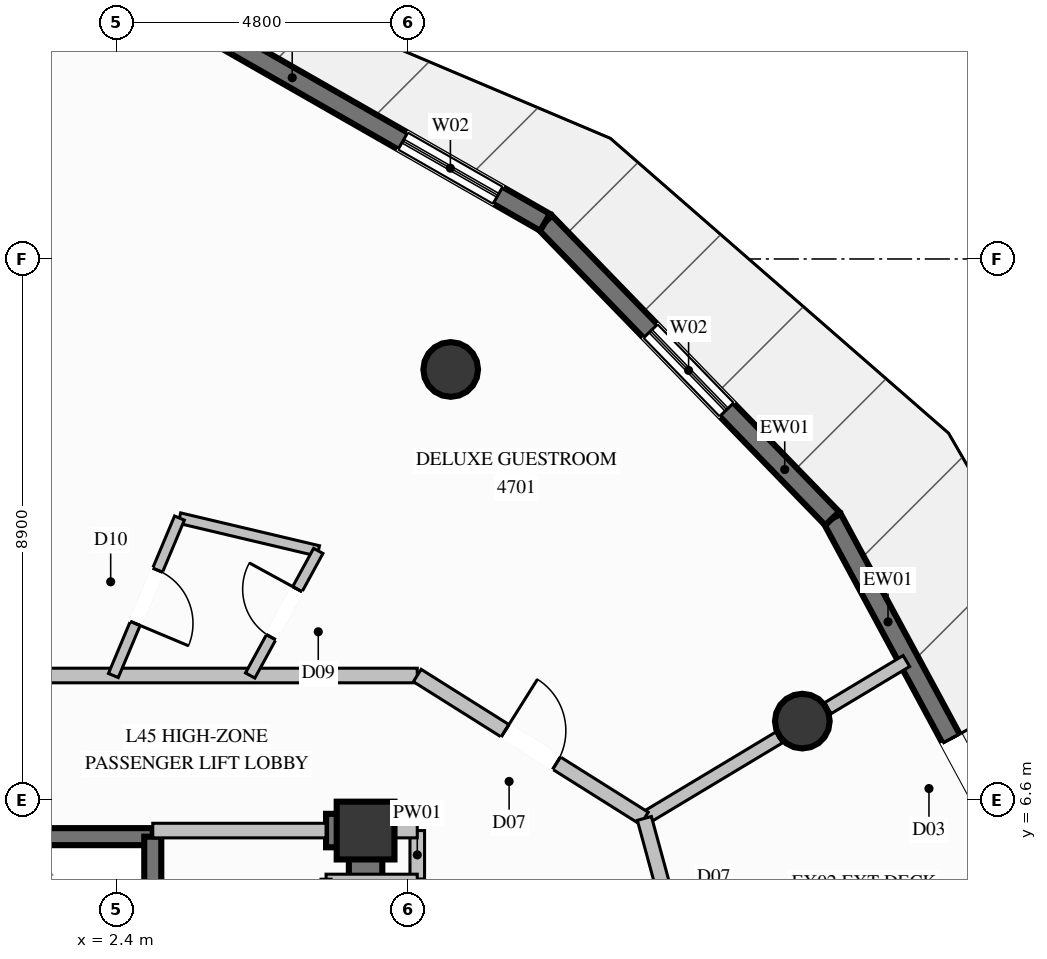
"""IFC4 building model, lengths in metres.
Left out: names, types, materials, properties, quantities, classifications, styles, units other than length and angle.
Written with IfcOpenShell. Run it as: python <this file> out.ifc"""

import sys

from ifc_helpers import new_model, si_unit, direction, frame, frame_2d, origin, origin_2d, place, context, subcontext, project, spatial, rectangle, circle, extrude, element, fill, save


model = new_model("IFC4")
c1 = context("Model", 3, precision=1e-05, world=origin(), true_north=direction((0.0, 1.0)))
c2 = subcontext(c1, "Body", "Model", "MODEL_VIEW")
j1 = project(units=[si_unit("LENGTHUNIT", "METRE"), si_unit("PLANEANGLEUNIT", "RADIAN")], contexts=[c1])
p1 = place(None, origin())
s1 = spatial("IfcSite", under=j1, at=p1, CompositionType="ELEMENT")
p2 = place(p1, origin())
s2 = spatial("IfcBuilding", under=s1, at=p2, CompositionType="ELEMENT")
p3 = place(p2, frame((0.0, 0.0, 176.8)))
s3 = spatial("IfcBuildingStorey", under=s2, at=p3, CompositionType="ELEMENT", Elevation=176.8)
p4 = place(p3, frame((6.5, 6.1, 0.0), z_axis=(0.0, 0.0, 1.0), x_axis=(1.0, 0.0, 0.0)))
e1 = element("IfcColumn", 1, at=p4, inside=s3, PredefinedType="COLUMN", context=c2, shape_type="SweptSolid", body=[
    extrude(rectangle(XDim=0.95, YDim=0.95, at=origin_2d()), origin(), (0.0, 0.0, 1.0), 3.6),
])
p5 = place(p3, frame((5.85, 6.1, 0.0), z_axis=(0.0, 0.0, 1.0), x_axis=(1.0, 0.0, 0.0)))
e2 = element("IfcWall", 2, at=p5, inside=s3, PredefinedType="SHEAR", context=c2, shape_type="SweptSolid", body=[
    extrude(rectangle(XDim=0.375, YDim=0.55, at=frame_2d((0.188, 0.0))), origin(), (0.0, 0.0, 1.0), 3.6),
])
p6 = place(p3, frame((6.5, 3.35, 0.0), z_axis=(0.0, 0.0, 1.0), x_axis=(0.0, 1.0, 0.0)))
e3 = element("IfcWall", 3, at=p6, inside=s3, PredefinedType="SHEAR", context=c2, shape_type="SweptSolid", body=[
    extrude(rectangle(XDim=3.025, YDim=0.55, at=frame_2d((1.512, 0.0))), origin(), (0.0, 0.0, 1.0), 3.6),
])
for number, where, z_axis, x_axis in (
    (4, (13.683, 7.9, 0.0), (0.0, 0.0, 1.0), (1.0, 0.0, 0.0)),
    (5, (7.9, 13.683, 0.0), (0.0, 0.0, 1.0), (1.0, 0.0, 0.0)),
):
    element("IfcColumn", number, at=place(p3, frame(where, z_axis=z_axis, x_axis=x_axis)), inside=s3, PredefinedType="COLUMN", context=c2, shape_type="SweptSolid", body=[
        extrude(circle(Radius=0.45, at=origin_2d()), origin(), (0.0, 0.0, 1.0), 3.6),
    ])
p7 = place(p3, frame((14.174, 11.232, 0.0), z_axis=(0.0, 0.0, 1.0), x_axis=(0.475159501302, -0.879899680829, 0.0)))
e6 = element("IfcWall", 6, at=p7, inside=s3, PredefinedType="SOLIDWALL", context=c2, shape_type="SweptSolid", body=[
    extrude(rectangle(XDim=6.785, YDim=0.32, at=frame_2d((3.393, 0.0))), origin(), (0.0, 0.0, 1.0), 3.36),
])
p8 = place(p7, frame((4.114, 0.0, 0.0)))
e7 = element("IfcOpeningElement", 7, at=p8, cuts=e6, PredefinedType="OPENING", context=c2, shape_type="SweptSolid", body=[
    extrude(rectangle(XDim=1.1, YDim=2.2, at=frame_2d((0.55, 1.1))), frame((0.0, 0.17, 0.0), z_axis=(0.0, -1.0, 0.0), x_axis=(1.0, 0.0, 0.0)), (0.0, 0.0, 1.0), 0.34),
])
p9 = place(p3, frame((9.451, 16.103, 0.0), z_axis=(0.0, 0.0, 1.0), x_axis=(0.696119985346, -0.71792545992, 0.0)))
e8 = element("IfcWall", 8, at=p9, inside=s3, PredefinedType="SOLIDWALL", context=c2, shape_type="SweptSolid", body=[
    extrude(rectangle(XDim=6.785, YDim=0.32, at=frame_2d((3.393, 0.0))), origin(), (0.0, 0.0, 1.0), 3.36),
])
p10 = place(p9, frame((2.492, 0.0, 0.35)))
e9 = element("IfcOpeningElement", 9, at=p10, cuts=e8, PredefinedType="OPENING", context=c2, shape_type="SweptSolid", body=[
    extrude(rectangle(XDim=1.8, YDim=2.6, at=frame_2d((0.9, 1.3))), frame((0.0, 0.17, 0.0), z_axis=(0.0, -1.0, 0.0), x_axis=(1.0, 0.0, 0.0)), (0.0, 0.0, 1.0), 0.34),
])
p11 = place(p3, frame((3.69, 19.398, 0.0), z_axis=(0.0, 0.0, 1.0), x_axis=(0.868052920032, -0.496471678974, 0.0)))
e10 = element("IfcWall", 10, at=p11, inside=s3, PredefinedType="SOLIDWALL", context=c2, shape_type="SweptSolid", body=[
    extrude(rectangle(XDim=6.637, YDim=0.32, at=frame_2d((3.318, 0.0))), origin(), (0.0, 0.0, 1.0), 3.36),
])
p12 = place(p11, frame((3.944, 0.0, 0.35)))
e11 = element("IfcOpeningElement", 11, at=p12, cuts=e10, PredefinedType="OPENING", context=c2, shape_type="SweptSolid", body=[
    extrude(rectangle(XDim=1.8, YDim=2.6, at=frame_2d((0.9, 1.3))), frame((0.0, 0.17, 0.0), z_axis=(0.0, -1.0, 0.0), x_axis=(1.0, 0.0, 0.0)), (0.0, 0.0, 1.0), 0.34),
])
p13 = place(p3, frame((3.0, 6.0, 0.0), z_axis=(0.0, 0.0, 1.0), x_axis=(-1.0, 0.0, 0.0)))
e12 = element("IfcWall", 12, at=p13, inside=s3, PredefinedType="SOLIDWALL", context=c2, shape_type="SweptSolid", body=[
    extrude(rectangle(XDim=2.2, YDim=0.28, at=frame_2d((1.1, 0.0))), origin(), (0.0, 0.0, 1.0), 3.36),
])
p14 = place(p3, frame((3.0, 3.5, 0.0), z_axis=(0.0, 0.0, 1.0), x_axis=(0.0, 1.0, 0.0)))
e13 = element("IfcWall", 13, at=p14, inside=s3, PredefinedType="SOLIDWALL", context=c2, shape_type="SweptSolid", body=[
    extrude(rectangle(XDim=2.5, YDim=0.28, at=frame_2d((1.25, 0.0))), origin(), (0.0, 0.0, 1.0), 3.36),
])
p15 = place(p3, frame((-7.35, 8.65, 0.0), z_axis=(0.0, 0.0, 1.0), x_axis=(1.0, 0.0, 0.0)))
e14 = element("IfcWall", 14, at=p15, inside=s3, PredefinedType="PARTITIONING", context=c2, shape_type="SweptSolid", body=[
    extrude(rectangle(XDim=14.7, YDim=0.24, at=frame_2d((7.35, 0.0))), origin(), (0.0, 0.0, 1.0), 3.36),
])
p16 = place(p3, frame((3.0, 6.1, 0.0), z_axis=(0.0, 0.0, 1.0), x_axis=(1.0, 0.0, 0.0)))
e15 = element("IfcWall", 15, at=p16, inside=s3, PredefinedType="PARTITIONING", context=c2, shape_type="SweptSolid", body=[
    extrude(rectangle(XDim=2.85, YDim=0.24, at=frame_2d((1.425, 0.0))), origin(), (0.0, 0.0, 1.0), 2.445),
])
p17 = place(p3, frame((7.35, 5.3, 0.0), z_axis=(0.0, 0.0, 1.0), x_axis=(0.0, 1.0, 0.0)))
e16 = element("IfcWall", 16, at=p17, inside=s3, PredefinedType="PARTITIONING", context=c2, shape_type="SweptSolid", body=[
    extrude(rectangle(XDim=0.8, YDim=0.24, at=frame_2d((0.4, 0.0))), origin(), (0.0, 0.0, 1.0), 2.445),
])
p18 = place(p3, frame((6.5, 6.1, 0.0), z_axis=(0.0, 0.0, 1.0), x_axis=(1.0, 0.0, 0.0)))
e17 = element("IfcWall", 17, at=p18, inside=s3, PredefinedType="PARTITIONING", context=c2, shape_type="SweptSolid", body=[
    extrude(rectangle(XDim=0.85, YDim=0.24, at=frame_2d((0.425, 0.0))), origin(), (0.0, 0.0, 1.0), 2.876),
])
p19 = place(p3, frame((7.35, 5.3, 0.0), z_axis=(0.0, 0.0, 1.0), x_axis=(-1.0, 0.0, 0.0)))
e18 = element("IfcWall", 18, at=p19, inside=s3, PredefinedType="PARTITIONING", context=c2, shape_type="SweptSolid", body=[
    extrude(rectangle(XDim=1.5, YDim=0.165, at=frame_2d((0.75, 0.0))), origin(), (0.0, 0.0, 1.0), 2.445),
])
p20 = place(p3, frame((5.85, 5.3, 0.0), z_axis=(0.0, 0.0, 1.0), x_axis=(0.0, -1.0, 0.0)))
e19 = element("IfcWall", 19, at=p20, inside=s3, PredefinedType="PARTITIONING", context=c2, shape_type="SweptSolid", body=[
    extrude(rectangle(XDim=2.55, YDim=0.165, at=frame_2d((1.275, 0.0))), origin(), (0.0, 0.0, 1.0), 2.445),
])
p21 = place(p3, frame((11.085, 6.3, 0.0), z_axis=(0.0, 0.0, 1.0), x_axis=(0.857259301733, 0.514884928497, 0.0)))
e20 = element("IfcWall", 20, at=p21, inside=s3, PredefinedType="PARTITIONING", context=c2, shape_type="SweptSolid", body=[
    extrude(rectangle(XDim=2.583, YDim=0.21, at=frame_2d((1.292, 0.0))), origin(), (0.0, 0.0, 1.0), 2.876),
])
p22 = place(p3, frame((14.102, 8.112, 0.0), z_axis=(0.0, 0.0, 1.0), x_axis=(0.85729274583, 0.514829241543, 0.0)))
e21 = element("IfcWall", 21, at=p22, inside=s3, PredefinedType="PARTITIONING", context=c2, shape_type="SweptSolid", body=[
    extrude(rectangle(XDim=1.507, YDim=0.21, at=frame_2d((0.753, 0.0))), origin(), (0.0, 0.0, 1.0), 3.36),
])
p23 = place(p3, frame((3.439, 11.239, 0.0), z_axis=(0.0, 0.0, 1.0), x_axis=(0.973143510765, -0.230199277704, 0.0)))
e22 = element("IfcWall", 22, at=p23, inside=s3, PredefinedType="PLUMBINGWALL", context=c2, shape_type="SweptSolid", body=[
    extrude(rectangle(XDim=2.346, YDim=0.175, at=frame_2d((1.173, 0.0))), origin(), (0.0, 0.0, 1.0), 3.36),
])
p24 = place(p3, frame((3.439, 11.239, 0.0), z_axis=(0.0, 0.0, 1.0), x_axis=(-0.387077273479, -0.922047278807, 0.0)))
e23 = element("IfcWall", 23, at=p24, inside=s3, PredefinedType="PLUMBINGWALL", context=c2, shape_type="SweptSolid", body=[
    extrude(rectangle(XDim=2.808, YDim=0.175, at=frame_2d((1.404, 0.0))), origin(), (0.0, 0.0, 1.0), 3.36),
])
p25 = place(p24, frame((0.929, 0.0, 0.0)))
e24 = element("IfcOpeningElement", 24, at=p25, cuts=e23, PredefinedType="OPENING", context=c2, shape_type="SweptSolid", body=[
    extrude(rectangle(XDim=0.95, YDim=2.1, at=frame_2d((0.475, 1.05))), frame((0.0, 0.098, 0.0), z_axis=(0.0, -1.0, 0.0), x_axis=(1.0, 0.0, 0.0)), (0.0, 0.0, 1.0), 0.195),
])
p26 = place(p3, frame((4.602, 8.65, 0.0), z_axis=(0.0, 0.0, 1.0), x_axis=(0.479577167617, 0.877499709573, 0.0)))
e25 = element("IfcWall", 25, at=p26, inside=s3, PredefinedType="PLUMBINGWALL", context=c2, shape_type="SweptSolid", body=[
    extrude(rectangle(XDim=2.335, YDim=0.175, at=frame_2d((1.167, 0.0))), origin(), (0.0, 0.0, 1.0), 3.36),
])
p27 = place(p26, frame((0.718, 0.0, 0.0)))
e26 = element("IfcOpeningElement", 26, at=p27, cuts=e25, PredefinedType="OPENING", context=c2, shape_type="SweptSolid", body=[
    extrude(rectangle(XDim=0.9, YDim=2.1, at=frame_2d((0.45, 1.05))), frame((0.0, 0.098, 0.0), z_axis=(0.0, -1.0, 0.0), x_axis=(1.0, 0.0, 0.0)), (0.0, 0.0, 1.0), 0.195),
])
p28 = place(p3, frame((7.35, 8.65, 0.0), z_axis=(0.0, 0.0, 1.0), x_axis=(0.846409267484, -0.532532958526, 0.0)))
e27 = element("IfcWall", 27, at=p28, inside=s3, PredefinedType="PARTITIONING", context=c2, shape_type="SweptSolid", body=[
    extrude(rectangle(XDim=4.413, YDim=0.24, at=frame_2d((2.206, 0.0))), origin(), (0.0, 0.0, 1.0), 3.36),
])
p29 = place(p28, frame((1.706, 0.0, 0.0)))
e28 = element("IfcOpeningElement", 28, at=p29, cuts=e27, PredefinedType="OPENING", context=c2, shape_type="SweptSolid", body=[
    extrude(rectangle(XDim=1.0, YDim=2.2, at=frame_2d((0.5, 1.1))), frame((0.0, 0.13, 0.0), z_axis=(0.0, -1.0, 0.0), x_axis=(1.0, 0.0, 0.0)), (0.0, 0.0, 1.0), 0.26),
])
p30 = place(p3, frame((12.08, 2.646, 0.0), z_axis=(0.0, 0.0, 1.0), x_axis=(-0.262762825819, 0.964860454868, 0.0)))
e29 = element("IfcWall", 29, at=p30, inside=s3, PredefinedType="PARTITIONING", context=c2, shape_type="SweptSolid", body=[
    extrude(rectangle(XDim=3.787, YDim=0.24, at=frame_2d((1.894, 0.0))), origin(), (0.0, 0.0, 1.0), 3.36),
])
p31 = place(p30, frame((1.394, 0.0, 0.0)))
e30 = element("IfcOpeningElement", 30, at=p31, cuts=e29, PredefinedType="OPENING", context=c2, shape_type="SweptSolid", body=[
    extrude(rectangle(XDim=1.0, YDim=2.2, at=frame_2d((0.5, 1.1))), frame((0.0, 0.13, 0.0), z_axis=(0.0, -1.0, 0.0), x_axis=(1.0, 0.0, 0.0)), (0.0, 0.0, 1.0), 0.26),
])
p32 = place(p8, origin())
e31 = element("IfcDoor", 31, at=p32, inside=s3, OperationType="SINGLE_SWING_LEFT", PredefinedType="DOOR", context=c2, shape_type="SweptSolid", body=[
    extrude(rectangle(XDim=1.1, YDim=2.2, at=frame_2d((0.55, 1.1))), frame((0.0, 0.025, 0.0), z_axis=(0.0, -1.0, 0.0), x_axis=(1.0, 0.0, 0.0)), (0.0, 0.0, 1.0), 0.05),
])
fill(e7, e31)
p33 = place(p10, origin())
e32 = element("IfcWindow", 32, at=p33, inside=s3, PartitioningType="SINGLE_PANEL", PredefinedType="WINDOW", context=c2, shape_type="SweptSolid", body=[
    extrude(rectangle(XDim=1.8, YDim=2.6, at=frame_2d((0.9, 1.3))), frame((0.0, 0.03, 0.0), z_axis=(0.0, -1.0, 0.0), x_axis=(1.0, 0.0, 0.0)), (0.0, 0.0, 1.0), 0.06),
])
fill(e9, e32)
p34 = place(p12, origin())
e33 = element("IfcWindow", 33, at=p34, inside=s3, PartitioningType="SINGLE_PANEL", PredefinedType="WINDOW", context=c2, shape_type="SweptSolid", body=[
    extrude(rectangle(XDim=1.8, YDim=2.6, at=frame_2d((0.9, 1.3))), frame((0.0, 0.03, 0.0), z_axis=(0.0, -1.0, 0.0), x_axis=(1.0, 0.0, 0.0)), (0.0, 0.0, 1.0), 0.06),
])
fill(e11, e33)
p35 = place(p27, origin())
e34 = element("IfcDoor", 34, at=p35, inside=s3, OperationType="SINGLE_SWING_RIGHT", PredefinedType="DOOR", context=c2, shape_type="SweptSolid", body=[
    extrude(rectangle(XDim=0.9, YDim=2.1, at=frame_2d((0.45, 1.05))), frame((0.0, 0.025, 0.0), z_axis=(0.0, -1.0, 0.0), x_axis=(1.0, 0.0, 0.0)), (0.0, 0.0, 1.0), 0.05),
])
fill(e26, e34)
p36 = place(p29, origin())
e35 = element("IfcDoor", 35, at=p36, inside=s3, OperationType="SINGLE_SWING_LEFT", PredefinedType="DOOR", context=c2, shape_type="SweptSolid", body=[
    extrude(rectangle(XDim=1.0, YDim=2.2, at=frame_2d((0.5, 1.1))), frame((0.0, 0.025, 0.0), z_axis=(0.0, -1.0, 0.0), x_axis=(1.0, 0.0, 0.0)), (0.0, 0.0, 1.0), 0.05),
])
fill(e28, e35)
p37 = place(p25, origin())
e36 = element("IfcDoor", 36, at=p37, inside=s3, OperationType="SINGLE_SWING_RIGHT", PredefinedType="DOOR", context=c2, shape_type="SweptSolid", body=[
    extrude(rectangle(XDim=0.95, YDim=2.1, at=frame_2d((0.475, 1.05))), frame((0.0, 0.025, 0.0), z_axis=(0.0, -1.0, 0.0), x_axis=(1.0, 0.0, 0.0)), (0.0, 0.0, 1.0), 0.05),
])
fill(e24, e36)
save(model, sys.argv[1])
